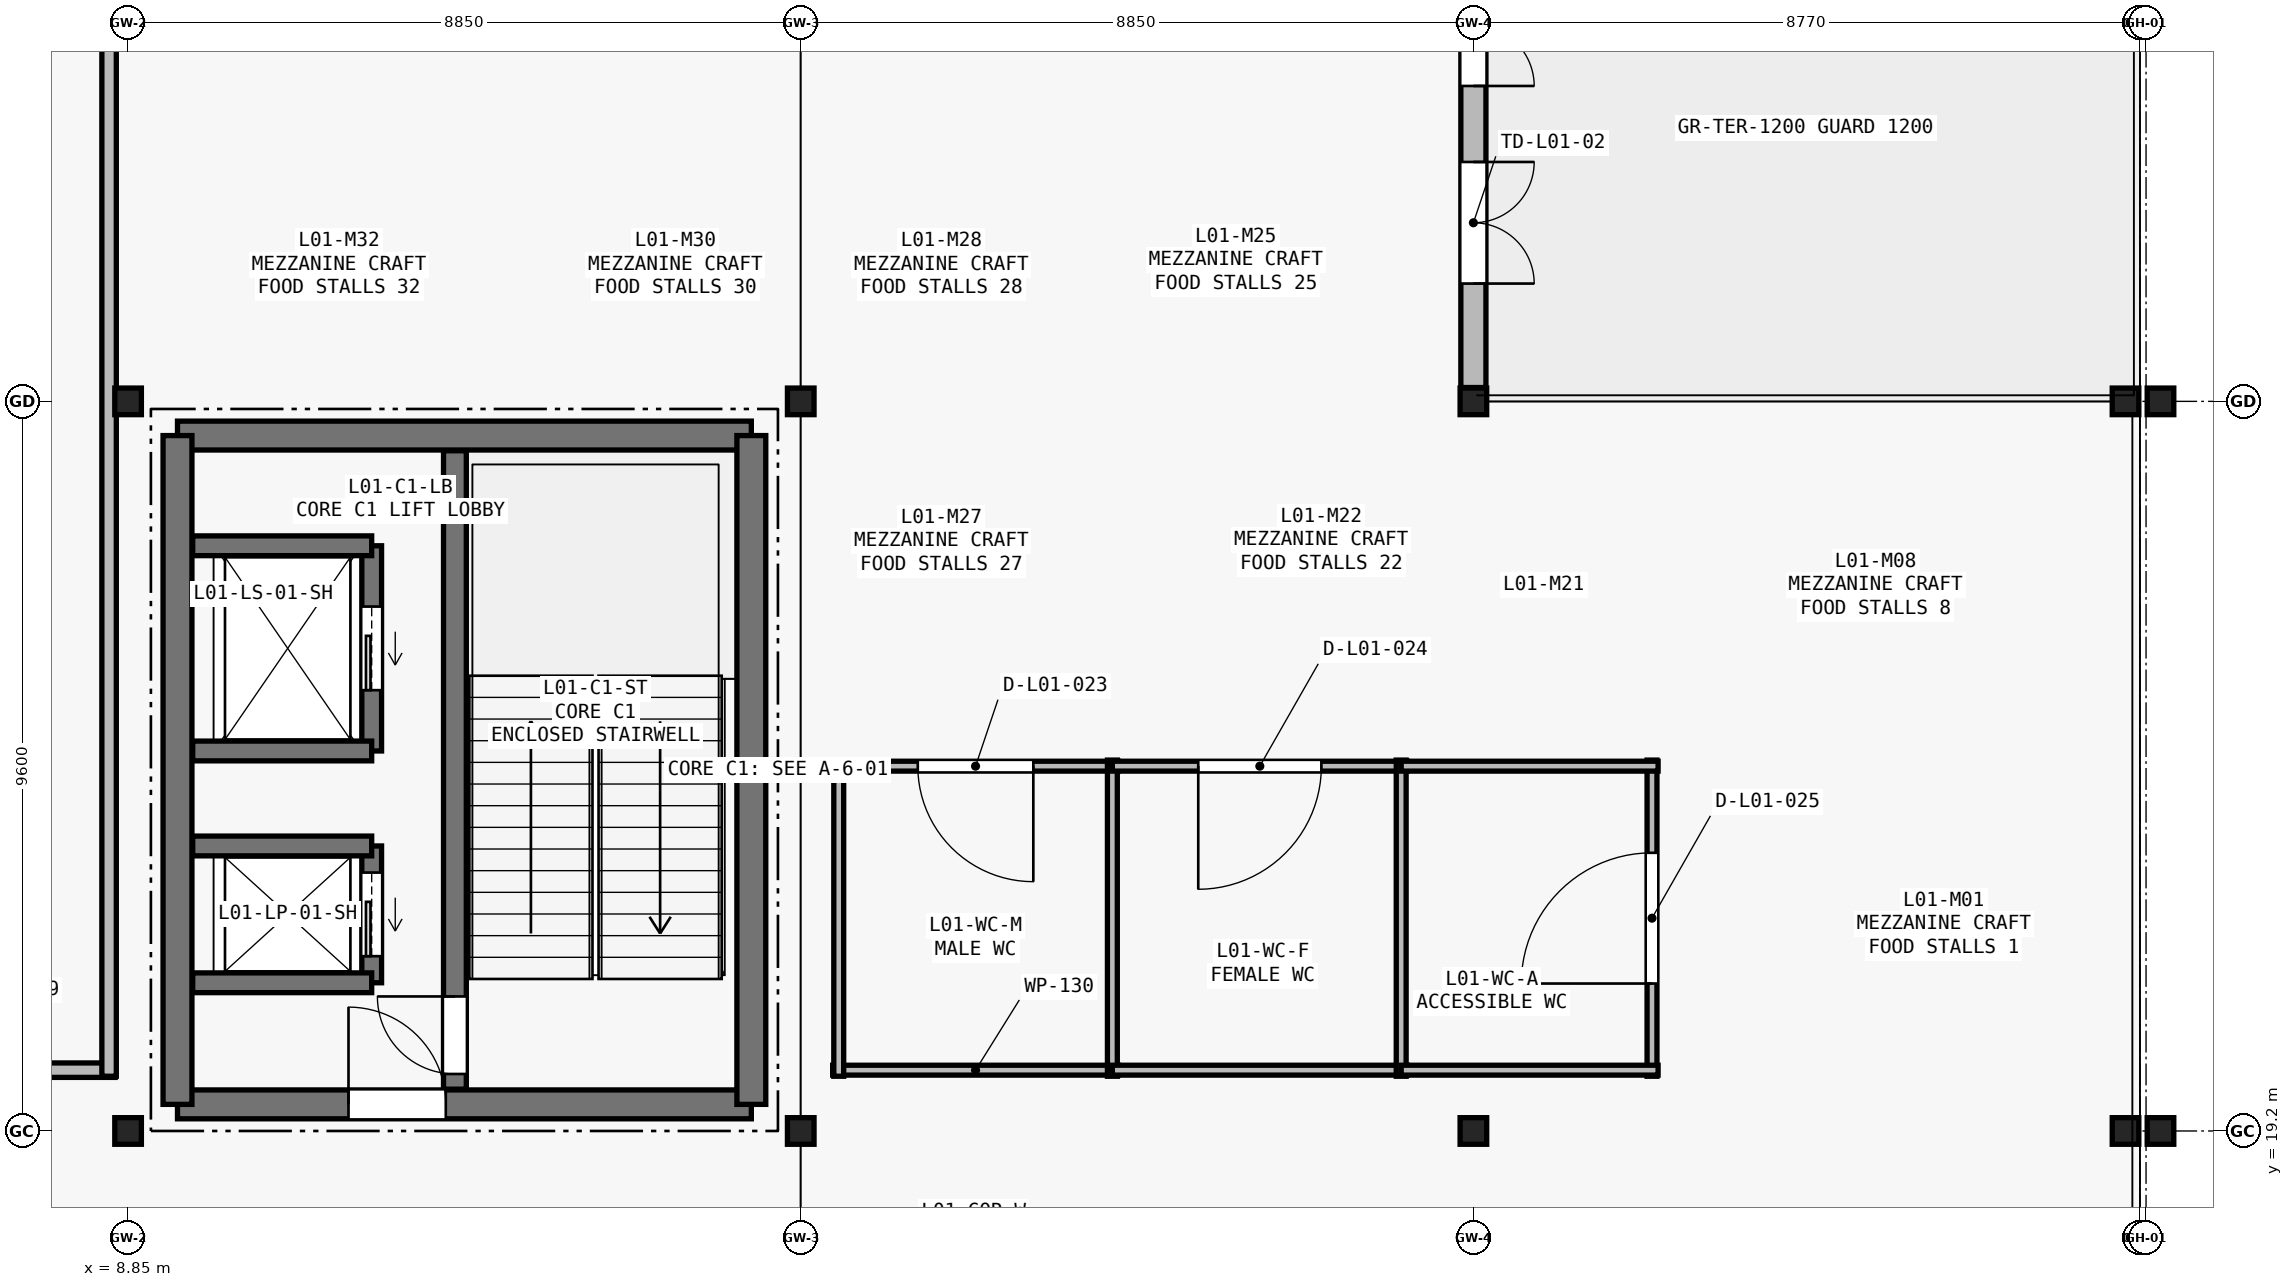
"""IFC4 building model, lengths in metres.
Left out: names, types, materials, properties, quantities, classifications, styles, units other than length and angle.
Written with IfcOpenShell. Run it as: python <this file> out.ifc"""

import sys

from ifc_helpers import new_model, si_unit, direction, frame, frame_2d, origin, origin_2d, place, context, subcontext, project, spatial, rectangle, i_section, extrude, element, fill, save


model = new_model("IFC4")
c1 = context("Model", 3, precision=1e-05, world=origin(), true_north=direction((0.0, 1.0)))
c2 = subcontext(c1, "Body", "Model", "MODEL_VIEW")
j1 = project(units=[si_unit("LENGTHUNIT", "METRE"), si_unit("PLANEANGLEUNIT", "RADIAN")], contexts=[c1])
p1 = place(None, origin())
s1 = spatial("IfcSite", under=j1, at=p1, CompositionType="ELEMENT")
p2 = place(p1, origin())
s2 = spatial("IfcBuilding", under=s1, at=p2, CompositionType="ELEMENT")
p3 = place(p2, frame((0.0, 0.0, 6.0)))
s3 = spatial("IfcBuildingStorey", under=s2, at=p3, CompositionType="ELEMENT", Elevation=6.0)
for number, where, z_axis, x_axis in (
    (1, (8.85, 19.2, 0.0), (0.0, 0.0, 1.0), (1.0, 0.0, 0.0)),
    (2, (8.85, 28.8, 0.0), (0.0, 0.0, 1.0), (1.0, 0.0, 0.0)),
    (3, (17.7, 19.2, 0.0), (0.0, 0.0, 1.0), (1.0, 0.0, 0.0)),
    (4, (17.7, 28.8, 0.0), (0.0, 0.0, 1.0), (1.0, 0.0, 0.0)),
    (5, (26.55, 19.2, 0.0), (0.0, 0.0, 1.0), (1.0, 0.0, 0.0)),
    (6, (26.55, 28.8, 0.0), (0.0, 0.0, 1.0), (1.0, 0.0, 0.0)),
    (7, (35.13, 19.2, 0.0), (0.0, 0.0, 1.0), (1.0, 0.0, 0.0)),
    (8, (35.13, 28.8, 0.0), (0.0, 0.0, 1.0), (1.0, 0.0, 0.0)),
    (9, (35.59, 19.2, 0.0), (0.0, 0.0, 1.0), (1.0, 0.0, 0.0)),
    (10, (35.59, 28.8, 0.0), (0.0, 0.0, 1.0), (1.0, 0.0, 0.0)),
):
    element("IfcColumn", number, at=place(p3, frame(where, z_axis=z_axis, x_axis=x_axis)), inside=s3, PredefinedType="COLUMN", context=c2, shape_type="SweptSolid", body=[
        extrude(i_section(OverallWidth=0.35, OverallDepth=0.35, WebThickness=0.012, FlangeThickness=0.019, FilletRadius=0.02, at=origin_2d()), origin(), (0.0, 0.0, 1.0), 4.8),
    ])
p4 = place(p3, frame((26.55, 35.65, 0.0), z_axis=(0.0, 0.0, 1.0), x_axis=(0.0, -1.0, 0.0)))
e11 = element("IfcWall", 11, at=p4, inside=s3, PredefinedType="SOLIDWALL", context=c2, shape_type="SweptSolid", body=[
    extrude(rectangle(XDim=6.668, YDim=0.33, at=frame_2d((3.334, 0.0))), origin(), (0.0, 0.0, 1.0), 3.95),
])
p5 = place(p4, frame((1.1, 0.0, 0.0)))
e12 = element("IfcOpeningElement", 12, at=p5, cuts=e11, PredefinedType="OPENING", context=c2, shape_type="SweptSolid", body=[
    extrude(rectangle(XDim=1.6, YDim=2.15, at=frame_2d((0.8, 1.075))), frame((0.0, 0.175, 0.0), z_axis=(0.0, -1.0, 0.0), x_axis=(1.0, 0.0, 0.0)), (0.0, 0.0, 1.0), 0.35),
])
p6 = place(p4, frame((3.7, 0.0, 0.0)))
e13 = element("IfcOpeningElement", 13, at=p6, cuts=e11, PredefinedType="OPENING", context=c2, shape_type="SweptSolid", body=[
    extrude(rectangle(XDim=1.6, YDim=2.15, at=frame_2d((0.8, 1.075))), frame((0.0, 0.175, 0.0), z_axis=(0.0, -1.0, 0.0), x_axis=(1.0, 0.0, 0.0)), (0.0, 0.0, 1.0), 0.35),
])
p7 = place(p3, frame((9.5, 19.55, 0.0), z_axis=(0.0, 0.0, 1.0), x_axis=(1.0, 0.0, 0.0)))
e14 = element("IfcWall", 14, at=p7, inside=s3, PredefinedType="SHEAR", context=c2, shape_type="SweptSolid", body=[
    extrude(rectangle(XDim=7.55, YDim=0.38, at=frame_2d((3.775, 0.0))), origin(), (0.0, 0.0, 1.0), 4.8),
])
p8 = place(p7, frame((2.25, 0.0, 0.0)))
e15 = element("IfcOpeningElement", 15, at=p8, cuts=e14, PredefinedType="OPENING", context=c2, shape_type="SweptSolid", body=[
    extrude(rectangle(XDim=1.28, YDim=2.15, at=frame_2d((0.64, 1.075))), frame((0.0, 0.2, 0.0), z_axis=(0.0, -1.0, 0.0), x_axis=(1.0, 0.0, 0.0)), (0.0, 0.0, 1.0), 0.4),
])
p9 = place(p3, frame((17.05, 28.35, 0.0), z_axis=(0.0, 0.0, 1.0), x_axis=(-1.0, 0.0, 0.0)))
e16 = element("IfcWall", 16, at=p9, inside=s3, PredefinedType="SHEAR", context=c2, shape_type="SweptSolid", body=[
    extrude(rectangle(XDim=7.55, YDim=0.38, at=frame_2d((3.775, 0.0))), origin(), (0.0, 0.0, 1.0), 4.8),
])
for number, where, z_axis, x_axis in (
    (17, (9.5, 28.35, 0.0), (0.0, 0.0, 1.0), (0.0, -1.0, 0.0)),
    (18, (17.05, 19.55, 0.0), (0.0, 0.0, 1.0), (0.0, 1.0, 0.0)),
):
    element("IfcWall", number, at=place(p3, frame(where, z_axis=z_axis, x_axis=x_axis)), inside=s3, PredefinedType="SHEAR", context=c2, shape_type="SweptSolid", body=[
        extrude(rectangle(XDim=8.8, YDim=0.38, at=frame_2d((4.4, 0.0))), origin(), (0.0, 0.0, 1.0), 4.8),
    ])
p10 = place(p3, frame((13.15, 19.75, 0.0), z_axis=(0.0, 0.0, 1.0), x_axis=(0.0, 1.0, 0.0)))
e19 = element("IfcWall", 19, at=p10, inside=s3, PredefinedType="SHEAR", context=c2, shape_type="SweptSolid", body=[
    extrude(rectangle(XDim=8.4, YDim=0.3, at=frame_2d((4.2, 0.0))), origin(), (0.0, 0.0, 1.0), 4.8),
])
p11 = place(p10, frame((0.2, 0.0, 0.0)))
e20 = element("IfcOpeningElement", 20, at=p11, cuts=e19, PredefinedType="OPENING", context=c2, shape_type="SweptSolid", body=[
    extrude(rectangle(XDim=1.02, YDim=2.1, at=frame_2d((0.51, 1.05))), frame((0.0, 0.16, 0.0), z_axis=(0.0, -1.0, 0.0), x_axis=(1.0, 0.0, 0.0)), (0.0, 0.0, 1.0), 0.32),
])
p12 = place(p3, frame((12.055, 21.15, 0.0), z_axis=(0.0, 0.0, 1.0), x_axis=(0.0, 1.0, 0.0)))
e21 = element("IfcWall", 21, at=p12, inside=s3, PredefinedType="SHEAR", context=c2, shape_type="SweptSolid", body=[
    extrude(rectangle(XDim=1.8, YDim=0.26, at=frame_2d((0.9, 0.0))), origin(), (0.0, 0.0, 1.0), 4.8),
])
p13 = place(p12, frame((0.35, 0.0, 0.0)))
e22 = element("IfcOpeningElement", 22, at=p13, cuts=e21, PredefinedType="OPENING", context=c2, shape_type="SweptSolid", body=[
    extrude(rectangle(XDim=1.1, YDim=2.15, at=frame_2d((0.55, 1.075))), frame((0.0, 0.14, 0.0), z_axis=(0.0, -1.0, 0.0), x_axis=(1.0, 0.0, 0.0)), (0.0, 0.0, 1.0), 0.28),
])
for number, where, z_axis, x_axis in (
    (23, (9.7, 21.15, 0.0), (0.0, 0.0, 1.0), (1.0, 0.0, 0.0)),
    (24, (9.7, 22.95, 0.0), (0.0, 0.0, 1.0), (1.0, 0.0, 0.0)),
):
    element("IfcWall", number, at=place(p3, frame(where, z_axis=z_axis, x_axis=x_axis)), inside=s3, PredefinedType="SHEAR", context=c2, shape_type="SweptSolid", body=[
        extrude(rectangle(XDim=2.355, YDim=0.26, at=frame_2d((1.177, 0.0))), origin(), (0.0, 0.0, 1.0), 4.8),
    ])
p14 = place(p3, frame((12.055, 24.2, 0.0), z_axis=(0.0, 0.0, 1.0), x_axis=(0.0, 1.0, 0.0)))
e25 = element("IfcWall", 25, at=p14, inside=s3, PredefinedType="SHEAR", context=c2, shape_type="SweptSolid", body=[
    extrude(rectangle(XDim=2.7, YDim=0.26, at=frame_2d((1.35, 0.0))), origin(), (0.0, 0.0, 1.0), 4.8),
])
p15 = place(p14, frame((0.8, 0.0, 0.0)))
e26 = element("IfcOpeningElement", 26, at=p15, cuts=e25, PredefinedType="OPENING", context=c2, shape_type="SweptSolid", body=[
    extrude(rectangle(XDim=1.1, YDim=2.15, at=frame_2d((0.55, 1.075))), frame((0.0, 0.14, 0.0), z_axis=(0.0, -1.0, 0.0), x_axis=(1.0, 0.0, 0.0)), (0.0, 0.0, 1.0), 0.28),
])
for number, where, z_axis, x_axis in (
    (27, (9.7, 24.2, 0.0), (0.0, 0.0, 1.0), (1.0, 0.0, 0.0)),
    (28, (9.7, 26.9, 0.0), (0.0, 0.0, 1.0), (1.0, 0.0, 0.0)),
):
    element("IfcWall", number, at=place(p3, frame(where, z_axis=z_axis, x_axis=x_axis)), inside=s3, PredefinedType="SHEAR", context=c2, shape_type="SweptSolid", body=[
        extrude(rectangle(XDim=2.355, YDim=0.26, at=frame_2d((1.177, 0.0))), origin(), (0.0, 0.0, 1.0), 4.8),
    ])
p16 = place(p3, frame((21.88, 24.0, 0.0), z_axis=(0.0, 0.0, 1.0), x_axis=(-1.0, 0.0, 0.0)))
e29 = element("IfcWall", 29, at=p16, inside=s3, PredefinedType="PARTITIONING", context=c2, shape_type="SweptSolid", body=[
    extrude(rectangle(XDim=3.76, YDim=0.13, at=frame_2d((1.88, 0.0))), origin(), (0.0, 0.0, 1.0), 4.32),
])
p17 = place(p16, frame((1.12, 0.0, 0.0)))
e30 = element("IfcOpeningElement", 30, at=p17, cuts=e29, PredefinedType="OPENING", context=c2, shape_type="SweptSolid", body=[
    extrude(rectangle(XDim=1.52, YDim=2.28, at=frame_2d((0.76, 1.14))), frame((0.0, 0.075, 0.0), z_axis=(0.0, -1.0, 0.0), x_axis=(1.0, 0.0, 0.0)), (0.0, 0.0, 1.0), 0.15),
])
p18 = place(p3, frame((18.12, 20.0, 0.0), z_axis=(0.0, 0.0, 1.0), x_axis=(1.0, 0.0, 0.0)))
e31 = element("IfcWall", 31, at=p18, inside=s3, PredefinedType="PARTITIONING", context=c2, shape_type="SweptSolid", body=[
    extrude(rectangle(XDim=3.76, YDim=0.13, at=frame_2d((1.88, 0.0))), origin(), (0.0, 0.0, 1.0), 4.32),
])
for number, where, z_axis, x_axis in (
    (32, (21.8, 19.92, 0.0), (0.0, 0.0, 1.0), (0.0, 1.0, 0.0)),
    (33, (18.2, 24.08, 0.0), (0.0, 0.0, 1.0), (0.0, -1.0, 0.0)),
):
    element("IfcWall", number, at=place(p3, frame(where, z_axis=z_axis, x_axis=x_axis)), inside=s3, PredefinedType="PARTITIONING", context=c2, shape_type="SweptSolid", body=[
        extrude(rectangle(XDim=4.16, YDim=0.13, at=frame_2d((2.08, 0.0))), origin(), (0.0, 0.0, 1.0), 4.32),
    ])
p19 = place(p3, frame((25.68, 24.0, 0.0), z_axis=(0.0, 0.0, 1.0), x_axis=(-1.0, 0.0, 0.0)))
e34 = element("IfcWall", 34, at=p19, inside=s3, PredefinedType="PARTITIONING", context=c2, shape_type="SweptSolid", body=[
    extrude(rectangle(XDim=3.88, YDim=0.13, at=frame_2d((1.94, 0.0))), origin(), (0.0, 0.0, 1.0), 4.32),
])
p20 = place(p19, frame((1.13, 0.0, 0.0)))
e35 = element("IfcOpeningElement", 35, at=p20, cuts=e34, PredefinedType="OPENING", context=c2, shape_type="SweptSolid", body=[
    extrude(rectangle(XDim=1.62, YDim=2.32, at=frame_2d((0.81, 1.16))), frame((0.0, 0.075, 0.0), z_axis=(0.0, -1.0, 0.0), x_axis=(1.0, 0.0, 0.0)), (0.0, 0.0, 1.0), 0.15),
])
p21 = place(p3, frame((21.8, 20.0, 0.0), z_axis=(0.0, 0.0, 1.0), x_axis=(1.0, 0.0, 0.0)))
e36 = element("IfcWall", 36, at=p21, inside=s3, PredefinedType="PARTITIONING", context=c2, shape_type="SweptSolid", body=[
    extrude(rectangle(XDim=3.88, YDim=0.13, at=frame_2d((1.94, 0.0))), origin(), (0.0, 0.0, 1.0), 4.32),
])
p22 = place(p3, frame((25.6, 19.92, 0.0), z_axis=(0.0, 0.0, 1.0), x_axis=(0.0, 1.0, 0.0)))
e37 = element("IfcWall", 37, at=p22, inside=s3, PredefinedType="PARTITIONING", context=c2, shape_type="SweptSolid", body=[
    extrude(rectangle(XDim=4.16, YDim=0.13, at=frame_2d((2.08, 0.0))), origin(), (0.0, 0.0, 1.0), 4.32),
])
p23 = place(p3, frame((28.9, 19.92, 0.0), z_axis=(0.0, 0.0, 1.0), x_axis=(0.0, 1.0, 0.0)))
e38 = element("IfcWall", 38, at=p23, inside=s3, PredefinedType="PARTITIONING", context=c2, shape_type="SweptSolid", body=[
    extrude(rectangle(XDim=4.16, YDim=0.13, at=frame_2d((2.08, 0.0))), origin(), (0.0, 0.0, 1.0), 4.32),
])
p24 = place(p23, frame((1.22, 0.0, 0.0)))
e39 = element("IfcOpeningElement", 39, at=p24, cuts=e38, PredefinedType="OPENING", context=c2, shape_type="SweptSolid", body=[
    extrude(rectangle(XDim=1.72, YDim=2.32, at=frame_2d((0.86, 1.16))), frame((0.0, 0.075, 0.0), z_axis=(0.0, -1.0, 0.0), x_axis=(1.0, 0.0, 0.0)), (0.0, 0.0, 1.0), 0.15),
])
for number, where, z_axis, x_axis in (
    (40, (28.98, 24.0, 0.0), (0.0, 0.0, 1.0), (-1.0, 0.0, 0.0)),
    (41, (25.6, 20.0, 0.0), (0.0, 0.0, 1.0), (1.0, 0.0, 0.0)),
):
    element("IfcWall", number, at=place(p3, frame(where, z_axis=z_axis, x_axis=x_axis)), inside=s3, PredefinedType="PARTITIONING", context=c2, shape_type="SweptSolid", body=[
        extrude(rectangle(XDim=3.38, YDim=0.13, at=frame_2d((1.69, 0.0))), origin(), (0.0, 0.0, 1.0), 4.32),
    ])
p25 = place(p3, frame((0.2, 20.0, 0.0), z_axis=(0.0, 0.0, 1.0), x_axis=(1.0, 0.0, 0.0)))
e42 = element("IfcWall", 42, at=p25, inside=s3, PredefinedType="PARTITIONING", context=c2, shape_type="SweptSolid", body=[
    extrude(rectangle(XDim=8.48, YDim=0.19, at=frame_2d((4.24, 0.0))), origin(), (0.0, 0.0, 1.0), 4.32),
])
p26 = place(p25, frame((5.515, 0.0, 0.0)))
e43 = element("IfcOpeningElement", 43, at=p26, cuts=e42, PredefinedType="OPENING", context=c2, shape_type="SweptSolid", body=[
    extrude(rectangle(XDim=0.98, YDim=2.36, at=frame_2d((0.49, 1.18))), frame((0.0, 0.105, 0.0), z_axis=(0.0, -1.0, 0.0), x_axis=(1.0, 0.0, 0.0)), (0.0, 0.0, 1.0), 0.21),
])
p27 = place(p3, frame((8.6, 19.92, 0.0), z_axis=(0.0, 0.0, 1.0), x_axis=(0.0, 1.0, 0.0)))
e44 = element("IfcWall", 44, at=p27, inside=s3, PredefinedType="PARTITIONING", context=c2, shape_type="SweptSolid", body=[
    extrude(rectangle(XDim=15.66, YDim=0.19, at=frame_2d((7.83, 0.0))), origin(), (0.0, 0.0, 1.0), 4.015),
])
p28 = place(p5, origin())
e45 = element("IfcDoor", 45, at=p28, inside=s3, OperationType="DOUBLE_DOOR_SINGLE_SWING", PredefinedType="DOOR", context=c2, shape_type="SweptSolid", body=[
    extrude(rectangle(XDim=1.6, YDim=2.15, at=frame_2d((0.8, 1.075))), frame((0.0, 0.025, 0.0), z_axis=(0.0, -1.0, 0.0), x_axis=(1.0, 0.0, 0.0)), (0.0, 0.0, 1.0), 0.05),
])
fill(e12, e45)
p29 = place(p6, origin())
e46 = element("IfcDoor", 46, at=p29, inside=s3, OperationType="DOUBLE_DOOR_SINGLE_SWING", PredefinedType="DOOR", context=c2, shape_type="SweptSolid", body=[
    extrude(rectangle(XDim=1.6, YDim=2.15, at=frame_2d((0.8, 1.075))), frame((0.0, 0.025, 0.0), z_axis=(0.0, -1.0, 0.0), x_axis=(1.0, 0.0, 0.0)), (0.0, 0.0, 1.0), 0.05),
])
fill(e13, e46)
p30 = place(p8, origin())
e47 = element("IfcDoor", 47, at=p30, inside=s3, OperationType="SINGLE_SWING_LEFT", PredefinedType="DOOR", context=c2, shape_type="SweptSolid", body=[
    extrude(rectangle(XDim=1.28, YDim=2.15, at=frame_2d((0.64, 1.075))), frame((0.0, 0.025, 0.0), z_axis=(0.0, -1.0, 0.0), x_axis=(1.0, 0.0, 0.0)), (0.0, 0.0, 1.0), 0.05),
])
fill(e15, e47)
p31 = place(p11, origin())
e48 = element("IfcDoor", 48, at=p31, inside=s3, OperationType="SINGLE_SWING_RIGHT", PredefinedType="DOOR", context=c2, shape_type="SweptSolid", body=[
    extrude(rectangle(XDim=1.02, YDim=2.1, at=frame_2d((0.51, 1.05))), frame((0.0, 0.025, 0.0), z_axis=(0.0, -1.0, 0.0), x_axis=(1.0, 0.0, 0.0)), (0.0, 0.0, 1.0), 0.05),
])
fill(e20, e48)
p32 = place(p13, origin())
e49 = element("IfcDoor", 49, at=p32, inside=s3, OperationType="SLIDING_TO_LEFT", PredefinedType="DOOR", context=c2, shape_type="SweptSolid", body=[
    extrude(rectangle(XDim=1.1, YDim=2.15, at=frame_2d((0.55, 1.075))), frame((0.0, 0.025, 0.0), z_axis=(0.0, -1.0, 0.0), x_axis=(1.0, 0.0, 0.0)), (0.0, 0.0, 1.0), 0.05),
])
fill(e22, e49)
p33 = place(p15, origin())
e50 = element("IfcDoor", 50, at=p33, inside=s3, OperationType="SLIDING_TO_LEFT", PredefinedType="DOOR", context=c2, shape_type="SweptSolid", body=[
    extrude(rectangle(XDim=1.1, YDim=2.15, at=frame_2d((0.55, 1.075))), frame((0.0, 0.025, 0.0), z_axis=(0.0, -1.0, 0.0), x_axis=(1.0, 0.0, 0.0)), (0.0, 0.0, 1.0), 0.05),
])
fill(e26, e50)
p34 = place(p17, origin())
e51 = element("IfcDoor", 51, at=p34, inside=s3, OperationType="SINGLE_SWING_LEFT", PredefinedType="DOOR", context=c2, shape_type="SweptSolid", body=[
    extrude(rectangle(XDim=1.52, YDim=2.28, at=frame_2d((0.76, 1.14))), frame((0.0, 0.025, 0.0), z_axis=(0.0, -1.0, 0.0), x_axis=(1.0, 0.0, 0.0)), (0.0, 0.0, 1.0), 0.05),
])
fill(e30, e51)
p35 = place(p20, origin())
e52 = element("IfcDoor", 52, at=p35, inside=s3, OperationType="SINGLE_SWING_RIGHT", PredefinedType="DOOR", context=c2, shape_type="SweptSolid", body=[
    extrude(rectangle(XDim=1.62, YDim=2.32, at=frame_2d((0.81, 1.16))), frame((0.0, 0.025, 0.0), z_axis=(0.0, -1.0, 0.0), x_axis=(1.0, 0.0, 0.0)), (0.0, 0.0, 1.0), 0.05),
])
fill(e35, e52)
p36 = place(p24, origin())
e53 = element("IfcDoor", 53, at=p36, inside=s3, OperationType="SINGLE_SWING_LEFT", PredefinedType="DOOR", context=c2, shape_type="SweptSolid", body=[
    extrude(rectangle(XDim=1.72, YDim=2.32, at=frame_2d((0.86, 1.16))), frame((0.0, 0.025, 0.0), z_axis=(0.0, -1.0, 0.0), x_axis=(1.0, 0.0, 0.0)), (0.0, 0.0, 1.0), 0.05),
])
fill(e39, e53)
save(model, sys.argv[1])
